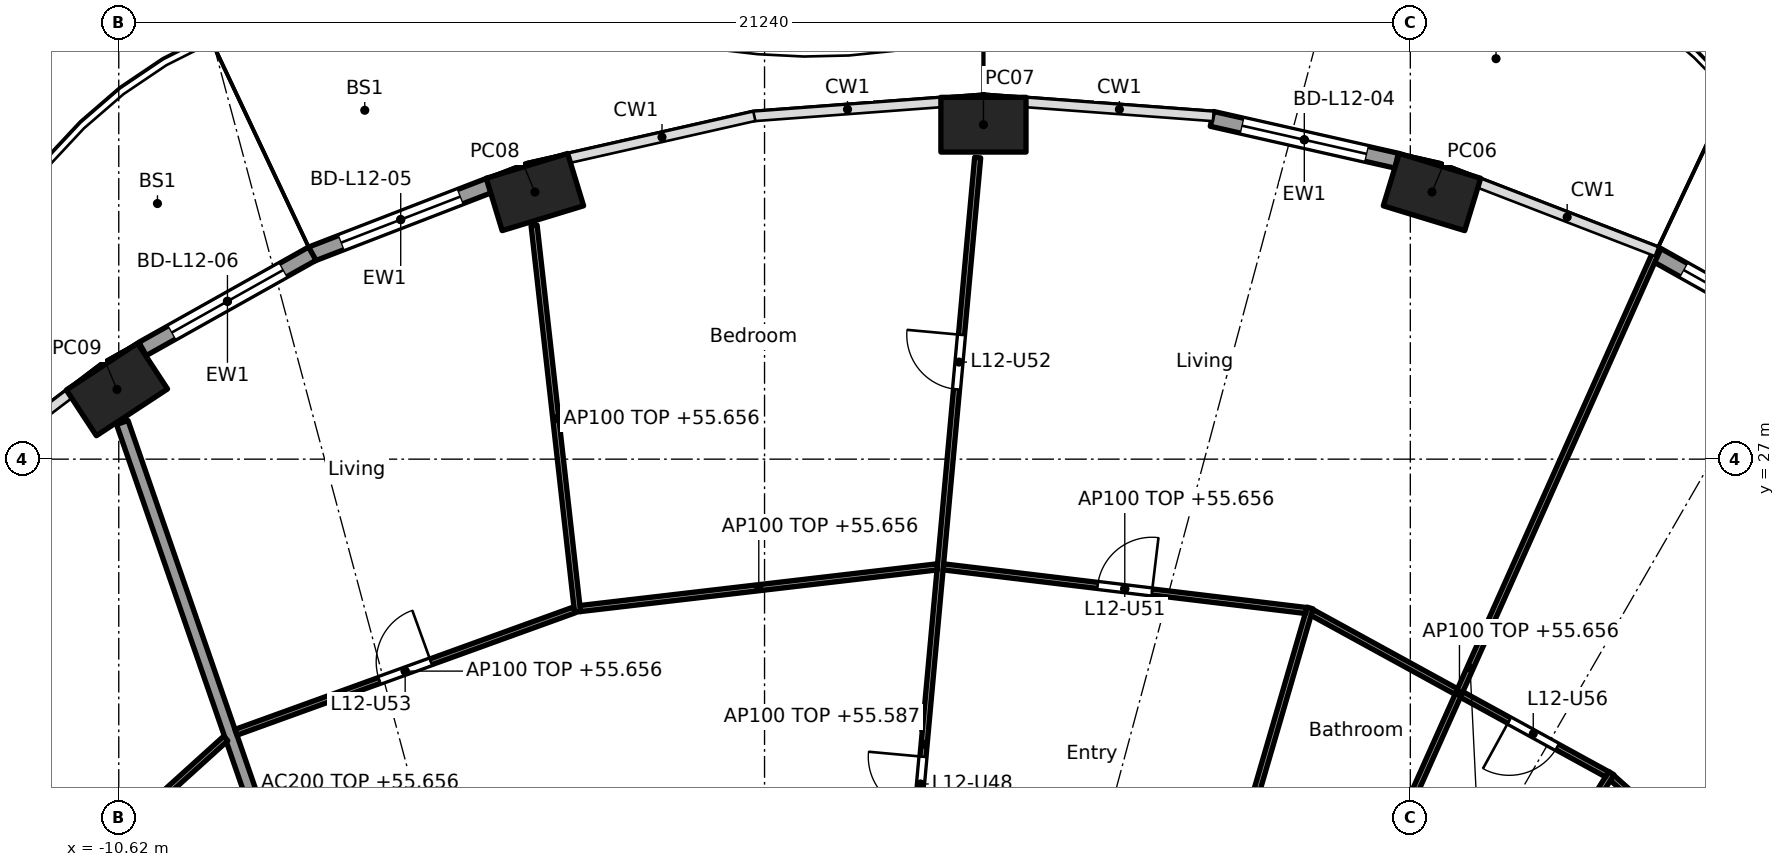
"""IFC4 building model, lengths in metres.
Left out: names, types, materials, properties, quantities, classifications, styles, units other than length and angle.
Written with IfcOpenShell. Run it as: python <this file> out.ifc"""

import sys

from ifc_helpers import new_model, si_unit, direction, frame, frame_2d, origin, origin_2d, place, context, subcontext, project, spatial, rectangle, hollow_rectangle, extrude, element, fill, save


model = new_model("IFC4")
c1 = context("Model", 3, precision=1e-05, world=origin(), true_north=direction((0.0, 1.0)))
c2 = subcontext(c1, "Body", "Model", "MODEL_VIEW")
j1 = project(units=[si_unit("LENGTHUNIT", "METRE"), si_unit("PLANEANGLEUNIT", "RADIAN")], contexts=[c1])
p1 = place(None, origin())
s1 = spatial("IfcSite", under=j1, at=p1, CompositionType="ELEMENT")
p2 = place(p1, origin())
s2 = spatial("IfcBuilding", under=s1, at=p2, CompositionType="ELEMENT")
p3 = place(p2, frame((0.0, 0.0, 52.9)))
s3 = spatial("IfcBuildingStorey", under=s2, at=p3, CompositionType="ELEMENT", Elevation=52.9)
for number, where, z_axis, x_axis in (
    (1, (10.976, 31.393, 0.0), (0.0, 0.0, 1.0), (-0.957, 0.292, 0.0)),
    (2, (3.6, 32.5, 0.0), (0.0, 0.0, 1.0), (-1.0, 0.0, 0.0)),
    (3, (-3.776, 31.393, 0.0), (0.0, 0.0, 1.0), (-0.957, -0.292, 0.0)),
    (4, (-10.65, 28.146, 0.0), (0.0, 0.0, 1.0), (-0.836, -0.549, 0.0)),
):
    element("IfcColumn", number, at=place(p3, frame(where, z_axis=z_axis, x_axis=x_axis)), inside=s3, PredefinedType="COLUMN", context=c2, shape_type="SweptSolid", body=[
        extrude(hollow_rectangle(XDim=1.4, YDim=0.9, WallThickness=0.05, at=origin_2d()), origin(), (0.0, 0.0, 1.0), 3.7),
    ])
p4 = place(p3, frame((14.637, 30.379, 0.0), z_axis=(0.0, 0.0, 1.0), x_axis=(0.872102558443, -0.489323132048, 0.0)))
e5 = element("IfcWall", 5, at=p4, inside=s3, PredefinedType="SOLIDWALL", context=c2, shape_type="SweptSolid", body=[
    extrude(rectangle(XDim=3.201, YDim=0.25, at=frame_2d((1.601, 0.0))), origin(), (0.0, 0.0, 1.0), 3.44),
])
p5 = place(p4, frame((0.551, 0.0, 0.0)))
e6 = element("IfcOpeningElement", 6, at=p5, cuts=e5, PredefinedType="OPENING", context=c2, shape_type="SweptSolid", body=[
    extrude(rectangle(XDim=2.1, YDim=2.4, at=frame_2d((1.05, 1.2))), frame((0.0, 0.135, 0.0), z_axis=(0.0, -1.0, 0.0), x_axis=(1.0, 0.0, 0.0)), (0.0, 0.0, 1.0), 0.27),
])
p6 = place(p3, frame((7.358, 32.596, 0.0), z_axis=(0.0, 0.0, 1.0), x_axis=(0.97533495413, -0.220729987208, 0.0)))
e7 = element("IfcWall", 7, at=p6, inside=s3, PredefinedType="SOLIDWALL", context=c2, shape_type="SweptSolid", body=[
    extrude(rectangle(XDim=3.115, YDim=0.25, at=frame_2d((1.557, 0.0))), origin(), (0.0, 0.0, 1.0), 3.44),
])
p7 = place(p6, frame((0.507, 0.0, 0.0)))
e8 = element("IfcOpeningElement", 8, at=p7, cuts=e7, PredefinedType="OPENING", context=c2, shape_type="SweptSolid", body=[
    extrude(rectangle(XDim=2.1, YDim=2.4, at=frame_2d((1.05, 1.2))), frame((0.0, 0.135, 0.0), z_axis=(0.0, -1.0, 0.0), x_axis=(1.0, 0.0, 0.0)), (0.0, 0.0, 1.0), 0.27),
])
p8 = place(p3, frame((-7.453, 30.371, 0.0), z_axis=(0.0, 0.0, 1.0), x_axis=(0.932809381943, 0.360370166577, 0.0)))
e9 = element("IfcWall", 9, at=p8, inside=s3, PredefinedType="SOLIDWALL", context=c2, shape_type="SweptSolid", body=[
    extrude(rectangle(XDim=3.151, YDim=0.25, at=frame_2d((1.575, 0.0))), origin(), (0.0, 0.0, 1.0), 3.44),
])
p9 = place(p8, frame((0.525, 0.0, 0.0)))
e10 = element("IfcOpeningElement", 10, at=p9, cuts=e9, PredefinedType="OPENING", context=c2, shape_type="SweptSolid", body=[
    extrude(rectangle(XDim=2.1, YDim=2.4, at=frame_2d((1.05, 1.2))), frame((0.0, 0.135, 0.0), z_axis=(0.0, -1.0, 0.0), x_axis=(1.0, 0.0, 0.0)), (0.0, 0.0, 1.0), 0.27),
])
p10 = place(p3, frame((-10.228, 28.812, 0.0), z_axis=(0.0, 0.0, 1.0), x_axis=(0.872084295691, 0.489355679653, 0.0)))
e11 = element("IfcWall", 11, at=p10, inside=s3, PredefinedType="SOLIDWALL", context=c2, shape_type="SweptSolid", body=[
    extrude(rectangle(XDim=3.201, YDim=0.25, at=frame_2d((1.601, 0.0))), origin(), (0.0, 0.0, 1.0), 3.44),
])
p11 = place(p10, frame((0.551, 0.0, 0.0)))
e12 = element("IfcOpeningElement", 12, at=p11, cuts=e11, PredefinedType="OPENING", context=c2, shape_type="SweptSolid", body=[
    extrude(rectangle(XDim=2.1, YDim=2.4, at=frame_2d((1.05, 1.2))), frame((0.0, 0.135, 0.0), z_axis=(0.0, -1.0, 0.0), x_axis=(1.0, 0.0, 0.0)), (0.0, 0.0, 1.0), 0.27),
])
p12 = place(p3, frame((-6.139, 14.829, 0.0), z_axis=(0.0, 0.0, 1.0), x_axis=(-0.327178799566, 0.944962450637, 0.0)))
e13 = element("IfcWall", 13, at=p12, inside=s3, PredefinedType="PARTITIONING", context=c2, shape_type="SweptSolid", body=[
    extrude(rectangle(XDim=13.517, YDim=0.2, at=frame_2d((6.759, 0.0))), origin(), (0.0, 0.0, 1.0), 2.756),
])
p13 = place(p3, frame((18.285, 17.877, 0.0), z_axis=(0.0, 0.0, 1.0), x_axis=(-0.745806142791, 0.666163041136, 0.0)))
e14 = element("IfcWall", 14, at=p13, inside=s3, PredefinedType="PARTITIONING", context=c2, shape_type="SweptSolid", body=[
    extrude(rectangle(XDim=5.831, YDim=0.1, at=frame_2d((2.915, 0.0))), origin(), (0.0, 0.0, 1.0), 2.756),
])
p14 = place(p13, frame((1.008, 0.0, 0.0)))
e15 = element("IfcOpeningElement", 15, at=p14, cuts=e14, PredefinedType="OPENING", context=c2, shape_type="SweptSolid", body=[
    extrude(rectangle(XDim=0.9, YDim=2.1, at=frame_2d((0.45, 1.05))), frame((0.0, 0.06, 0.0), z_axis=(0.0, -1.0, 0.0), x_axis=(1.0, 0.0, 0.0)), (0.0, 0.0, 1.0), 0.12),
])
p15 = place(p3, frame((10.003, 15.503, 0.0), z_axis=(0.0, 0.0, 1.0), x_axis=(0.52645953022, 0.850200189979, 0.0)))
e16 = element("IfcWall", 16, at=p15, inside=s3, PredefinedType="PARTITIONING", context=c2, shape_type="SweptSolid", body=[
    extrude(rectangle(XDim=7.45, YDim=0.1, at=frame_2d((3.725, 0.0))), origin(), (0.0, 0.0, 1.0), 2.756),
])
p16 = place(p3, frame((13.855, 21.818, 0.0), z_axis=(0.0, 0.0, 1.0), x_axis=(-0.876794415294, 0.480865421203, 0.0)))
e17 = element("IfcWall", 17, at=p16, inside=s3, PredefinedType="PARTITIONING", context=c2, shape_type="SweptSolid", body=[
    extrude(rectangle(XDim=5.536, YDim=0.1, at=frame_2d((2.768, 0.0))), origin(), (0.0, 0.0, 1.0), 2.756),
])
p17 = place(p16, frame((0.934, 0.0, 0.0)))
e18 = element("IfcOpeningElement", 18, at=p17, cuts=e17, PredefinedType="OPENING", context=c2, shape_type="SweptSolid", body=[
    extrude(rectangle(XDim=0.9, YDim=2.1, at=frame_2d((0.45, 1.05))), frame((0.0, 0.06, 0.0), z_axis=(0.0, -1.0, 0.0), x_axis=(1.0, 0.0, 0.0)), (0.0, 0.0, 1.0), 0.12),
])
p18 = place(p3, frame((8.524, 16.676, 0.0), z_axis=(0.0, 0.0, 1.0), x_axis=(0.408065177262, 0.912952797852, 0.0)))
e19 = element("IfcWall", 19, at=p18, inside=s3, PredefinedType="PARTITIONING", context=c2, shape_type="SweptSolid", body=[
    extrude(rectangle(XDim=15.089, YDim=0.1, at=frame_2d((7.544, 0.0))), origin(), (0.0, 0.0, 1.0), 2.837),
])
p19 = place(p3, frame((6.137, 14.83, 0.0), z_axis=(0.0, 0.0, 1.0), x_axis=(0.279843546189, 0.960045618529, 0.0)))
e20 = element("IfcWall", 20, at=p19, inside=s3, PredefinedType="PARTITIONING", context=c2, shape_type="SweptSolid", body=[
    extrude(rectangle(XDim=10.127, YDim=0.1, at=frame_2d((5.063, 0.0))), origin(), (0.0, 0.0, 1.0), 3.44),
])
p20 = place(p19, frame((1.334, 0.0, 0.0)))
e21 = element("IfcOpeningElement", 21, at=p20, cuts=e20, PredefinedType="OPENING", context=c2, shape_type="SweptSolid", body=[
    extrude(rectangle(XDim=0.9, YDim=2.1, at=frame_2d((0.45, 1.05))), frame((0.0, 0.06, 0.0), z_axis=(0.0, -1.0, 0.0), x_axis=(1.0, 0.0, 0.0)), (0.0, 0.0, 1.0), 0.12),
])
p21 = place(p19, frame((6.091, 0.0, 0.0)))
e22 = element("IfcOpeningElement", 22, at=p21, cuts=e20, PredefinedType="OPENING", context=c2, shape_type="SweptSolid", body=[
    extrude(rectangle(XDim=0.9, YDim=2.1, at=frame_2d((0.45, 1.05))), frame((0.0, 0.06, 0.0), z_axis=(0.0, -1.0, 0.0), x_axis=(1.0, 0.0, 0.0)), (0.0, 0.0, 1.0), 0.12),
])
p22 = place(p3, frame((8.907, 24.51, 0.0), z_axis=(0.0, 0.0, 1.0), x_axis=(-0.992836798252, 0.119478416615, 0.0)))
e23 = element("IfcWall", 23, at=p22, inside=s3, PredefinedType="PARTITIONING", context=c2, shape_type="SweptSolid", body=[
    extrude(rectangle(XDim=6.01, YDim=0.1, at=frame_2d((3.005, 0.0))), origin(), (0.0, 0.0, 1.0), 2.756),
])
p23 = place(p22, frame((2.555, 0.0, 0.0)))
e24 = element("IfcOpeningElement", 24, at=p23, cuts=e23, PredefinedType="OPENING", context=c2, shape_type="SweptSolid", body=[
    extrude(rectangle(XDim=0.9, YDim=2.1, at=frame_2d((0.45, 1.05))), frame((0.0, 0.06, 0.0), z_axis=(0.0, -1.0, 0.0), x_axis=(1.0, 0.0, 0.0)), (0.0, 0.0, 1.0), 0.12),
])
p24 = place(p3, frame((1.744, 12.664, 0.0), z_axis=(0.0, 0.0, 1.0), x_axis=(0.090893639596, 0.995860605849, 0.0)))
e25 = element("IfcWall", 25, at=p24, inside=s3, PredefinedType="PARTITIONING", context=c2, shape_type="SweptSolid", body=[
    extrude(rectangle(XDim=19.374, YDim=0.1, at=frame_2d((9.687, 0.0))), origin(), (0.0, 0.0, 1.0), 2.687),
])
p25 = place(p24, frame((2.27, 0.0, 0.0)))
e26 = element("IfcOpeningElement", 26, at=p25, cuts=e25, PredefinedType="OPENING", context=c2, shape_type="SweptSolid", body=[
    extrude(rectangle(XDim=0.9, YDim=2.1, at=frame_2d((0.45, 1.05))), frame((0.0, 0.06, 0.0), z_axis=(0.0, -1.0, 0.0), x_axis=(1.0, 0.0, 0.0)), (0.0, 0.0, 1.0), 0.12),
])
p26 = place(p24, frame((8.582, 0.0, 0.0)))
e27 = element("IfcOpeningElement", 27, at=p26, cuts=e25, PredefinedType="OPENING", context=c2, shape_type="SweptSolid", body=[
    extrude(rectangle(XDim=0.9, YDim=2.1, at=frame_2d((0.45, 1.05))), frame((0.0, 0.06, 0.0), z_axis=(0.0, -1.0, 0.0), x_axis=(1.0, 0.0, 0.0)), (0.0, 0.0, 1.0), 0.12),
])
p27 = place(p24, frame((15.548, 0.0, 0.0)))
e28 = element("IfcOpeningElement", 28, at=p27, cuts=e25, PredefinedType="OPENING", context=c2, shape_type="SweptSolid", body=[
    extrude(rectangle(XDim=0.9, YDim=2.1, at=frame_2d((0.45, 1.05))), frame((0.0, 0.06, 0.0), z_axis=(0.0, -1.0, 0.0), x_axis=(1.0, 0.0, 0.0)), (0.0, 0.0, 1.0), 0.12),
])
p28 = place(p3, frame((2.842, 25.229, 0.0), z_axis=(0.0, 0.0, 1.0), x_axis=(-0.993255612046, -0.115945198862, 0.0)))
e29 = element("IfcWall", 29, at=p28, inside=s3, PredefinedType="PARTITIONING", context=c2, shape_type="SweptSolid", body=[
    extrude(rectangle(XDim=5.913, YDim=0.1, at=frame_2d((2.956, 0.0))), origin(), (0.0, 0.0, 1.0), 2.756),
])
p29 = place(p3, frame((-3.075, 24.488, 0.0), z_axis=(0.0, 0.0, 1.0), x_axis=(-0.111705235978, 0.993741384997, 0.0)))
e30 = element("IfcWall", 30, at=p29, inside=s3, PredefinedType="PARTITIONING", context=c2, shape_type="SweptSolid", body=[
    extrude(rectangle(XDim=6.395, YDim=0.1, at=frame_2d((3.198, 0.0))), origin(), (0.0, 0.0, 1.0), 2.756),
])
p30 = place(p3, frame((-3.128, 24.521, 0.0), z_axis=(0.0, 0.0, 1.0), x_axis=(-0.940401494588, -0.340066212636, 0.0)))
e31 = element("IfcWall", 31, at=p30, inside=s3, PredefinedType="PARTITIONING", context=c2, shape_type="SweptSolid", body=[
    extrude(rectangle(XDim=5.917, YDim=0.1, at=frame_2d((2.958, 0.0))), origin(), (0.0, 0.0, 1.0), 2.756),
])
p31 = place(p30, frame((2.509, 0.0, 0.0)))
e32 = element("IfcOpeningElement", 32, at=p31, cuts=e31, PredefinedType="OPENING", context=c2, shape_type="SweptSolid", body=[
    extrude(rectangle(XDim=0.9, YDim=2.1, at=frame_2d((0.45, 1.05))), frame((0.0, 0.06, 0.0), z_axis=(0.0, -1.0, 0.0), x_axis=(1.0, 0.0, 0.0)), (0.0, 0.0, 1.0), 0.12),
])
p32 = place(p3, frame((-8.861, 22.407, 0.0), z_axis=(0.0, 0.0, 1.0), x_axis=(-0.741713303551, -0.670717060567, 0.0)))
e33 = element("IfcWall", 33, at=p32, inside=s3, PredefinedType="PARTITIONING", context=c2, shape_type="SweptSolid", body=[
    extrude(rectangle(XDim=6.059, YDim=0.1, at=frame_2d((3.03, 0.0))), origin(), (0.0, 0.0, 1.0), 2.756),
])
p33 = place(p5, origin())
e34 = element("IfcDoor", 34, at=p33, inside=s3, OperationType="SLIDING_TO_LEFT", PredefinedType="DOOR", context=c2, shape_type="SweptSolid", body=[
    extrude(rectangle(XDim=2.1, YDim=2.4, at=frame_2d((1.05, 1.2))), frame((0.0, 0.025, 0.0), z_axis=(0.0, -1.0, 0.0), x_axis=(1.0, 0.0, 0.0)), (0.0, 0.0, 1.0), 0.05),
])
fill(e6, e34)
p34 = place(p7, origin())
e35 = element("IfcDoor", 35, at=p34, inside=s3, OperationType="SLIDING_TO_LEFT", PredefinedType="DOOR", context=c2, shape_type="SweptSolid", body=[
    extrude(rectangle(XDim=2.1, YDim=2.4, at=frame_2d((1.05, 1.2))), frame((0.0, 0.025, 0.0), z_axis=(0.0, -1.0, 0.0), x_axis=(1.0, 0.0, 0.0)), (0.0, 0.0, 1.0), 0.05),
])
fill(e8, e35)
p35 = place(p9, origin())
e36 = element("IfcDoor", 36, at=p35, inside=s3, OperationType="SLIDING_TO_LEFT", PredefinedType="DOOR", context=c2, shape_type="SweptSolid", body=[
    extrude(rectangle(XDim=2.1, YDim=2.4, at=frame_2d((1.05, 1.2))), frame((0.0, 0.025, 0.0), z_axis=(0.0, -1.0, 0.0), x_axis=(1.0, 0.0, 0.0)), (0.0, 0.0, 1.0), 0.05),
])
fill(e10, e36)
p36 = place(p11, origin())
e37 = element("IfcDoor", 37, at=p36, inside=s3, OperationType="SLIDING_TO_LEFT", PredefinedType="DOOR", context=c2, shape_type="SweptSolid", body=[
    extrude(rectangle(XDim=2.1, YDim=2.4, at=frame_2d((1.05, 1.2))), frame((0.0, 0.025, 0.0), z_axis=(0.0, -1.0, 0.0), x_axis=(1.0, 0.0, 0.0)), (0.0, 0.0, 1.0), 0.05),
])
fill(e12, e37)
p37 = place(p26, origin())
e38 = element("IfcDoor", 38, at=p37, inside=s3, OperationType="SINGLE_SWING_RIGHT", PredefinedType="DOOR", context=c2, shape_type="SweptSolid", body=[
    extrude(rectangle(XDim=0.9, YDim=2.1, at=frame_2d((0.45, 1.05))), frame((0.0, 0.025, 0.0), z_axis=(0.0, -1.0, 0.0), x_axis=(1.0, 0.0, 0.0)), (0.0, 0.0, 1.0), 0.05),
])
fill(e27, e38)
p38 = place(p23, frame((0.9, 0.0, 0.0), x_axis=(-1.0, 0.0, 0.0)))
e39 = element("IfcDoor", 39, at=p38, inside=s3, OperationType="SINGLE_SWING_RIGHT", PredefinedType="DOOR", context=c2, shape_type="SweptSolid", body=[
    extrude(rectangle(XDim=0.9, YDim=2.1, at=frame_2d((0.45, 1.05))), frame((0.0, 0.025, 0.0), z_axis=(0.0, -1.0, 0.0), x_axis=(1.0, 0.0, 0.0)), (0.0, 0.0, 1.0), 0.05),
])
fill(e24, e39)
p39 = place(p27, origin())
e40 = element("IfcDoor", 40, at=p39, inside=s3, OperationType="SINGLE_SWING_RIGHT", PredefinedType="DOOR", context=c2, shape_type="SweptSolid", body=[
    extrude(rectangle(XDim=0.9, YDim=2.1, at=frame_2d((0.45, 1.05))), frame((0.0, 0.025, 0.0), z_axis=(0.0, -1.0, 0.0), x_axis=(1.0, 0.0, 0.0)), (0.0, 0.0, 1.0), 0.05),
])
fill(e28, e40)
p40 = place(p31, frame((0.9, 0.0, 0.0), x_axis=(-1.0, 0.0, 0.0)))
e41 = element("IfcDoor", 41, at=p40, inside=s3, OperationType="SINGLE_SWING_RIGHT", PredefinedType="DOOR", context=c2, shape_type="SweptSolid", body=[
    extrude(rectangle(XDim=0.9, YDim=2.1, at=frame_2d((0.45, 1.05))), frame((0.0, 0.025, 0.0), z_axis=(0.0, -1.0, 0.0), x_axis=(1.0, 0.0, 0.0)), (0.0, 0.0, 1.0), 0.05),
])
fill(e32, e41)
p41 = place(p17, origin())
e42 = element("IfcDoor", 42, at=p41, inside=s3, OperationType="SINGLE_SWING_RIGHT", PredefinedType="DOOR", context=c2, shape_type="SweptSolid", body=[
    extrude(rectangle(XDim=0.9, YDim=2.1, at=frame_2d((0.45, 1.05))), frame((0.0, 0.025, 0.0), z_axis=(0.0, -1.0, 0.0), x_axis=(1.0, 0.0, 0.0)), (0.0, 0.0, 1.0), 0.05),
])
fill(e18, e42)
save(model, sys.argv[1])
